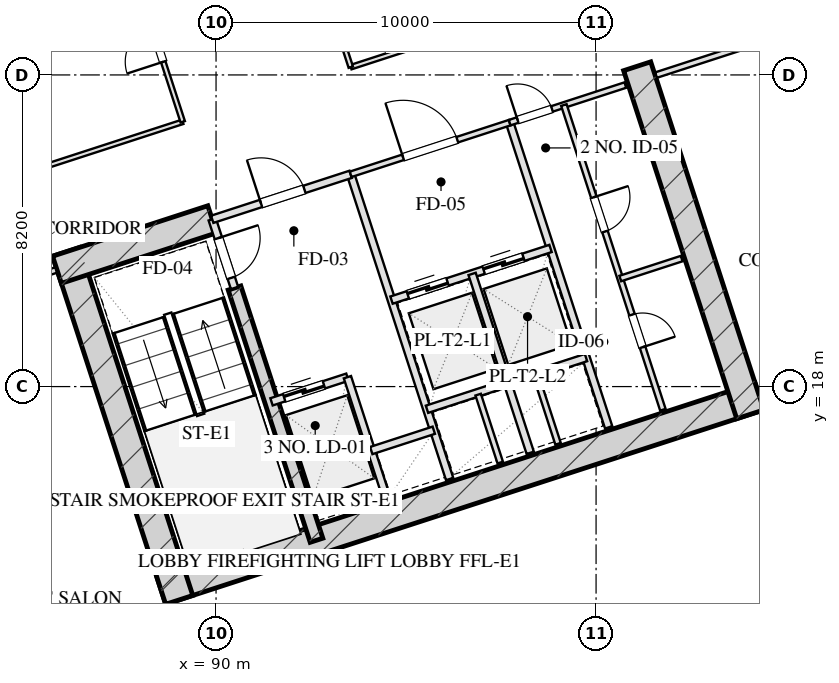
"""IFC4 building model, lengths in metres.
Left out: names, types, materials, properties, quantities, classifications, styles, units other than length and angle.
Written with IfcOpenShell. Run it as: python <this file> out.ifc"""

import sys

from ifc_helpers import new_model, si_unit, direction, frame, frame_2d, origin, place, context, subcontext, project, spatial, rectangle, extrude, element, fill, save


model = new_model("IFC4")
c1 = context("Model", 3, precision=1e-05, world=origin(), true_north=direction((0.0, 1.0)))
c2 = subcontext(c1, "Body", "Model", "MODEL_VIEW")
j1 = project(units=[si_unit("LENGTHUNIT", "METRE"), si_unit("PLANEANGLEUNIT", "RADIAN")], contexts=[c1])
p1 = place(None, origin())
s1 = spatial("IfcSite", under=j1, at=p1, CompositionType="ELEMENT")
p2 = place(p1, origin())
s2 = spatial("IfcBuilding", under=s1, at=p2, CompositionType="ELEMENT")
p3 = place(p2, frame((0.0, 0.0, 60.95)))
s3 = spatial("IfcBuildingStorey", under=s2, at=p3, CompositionType="ELEMENT", Elevation=60.95)
p4 = place(p3, frame((88.559, 12.629, 0.0), z_axis=(0.0, 0.0, 1.0), x_axis=(0.951056072937, 0.309018358888, 0.0)))
e1 = element("IfcWall", 1, at=p4, inside=s3, PredefinedType="SHEAR", context=c2, shape_type="SweptSolid", body=[
    extrude(rectangle(XDim=16.55, YDim=0.75, at=frame_2d((8.275, 0.0))), origin(), (0.0, 0.0, 1.0), 3.45),
])
p5 = place(p3, frame((86.055, 21.546, 0.0), z_axis=(0.0, 0.0, 1.0), x_axis=(0.309023585745, -0.951054374604, 0.0)))
e2 = element("IfcWall", 2, at=p5, inside=s3, PredefinedType="SHEAR", context=c2, shape_type="SweptSolid", body=[
    extrude(rectangle(XDim=9.63, YDim=0.75, at=frame_2d((4.815, 0.0))), origin(), (0.0, 0.0, 1.0), 3.45),
])
p6 = place(p3, frame((101.082, 26.429, 0.0), z_axis=(0.0, 0.0, 1.0), x_axis=(0.309016134813, -0.951056795583, 0.0)))
e3 = element("IfcWall", 3, at=p6, inside=s3, PredefinedType="SHEAR", context=c2, shape_type="SweptSolid", body=[
    extrude(rectangle(XDim=9.63, YDim=0.75, at=frame_2d((4.815, 0.0))), origin(), (0.0, 0.0, 1.0), 3.45),
])
p7 = place(p3, frame((90.486, 20.594, 0.0), z_axis=(0.0, 0.0, 1.0), x_axis=(0.309020428229, -0.951055400562, 0.0)))
e4 = element("IfcWall", 4, at=p7, inside=s3, PredefinedType="SHEAR", context=c2, shape_type="SweptSolid", body=[
    extrude(rectangle(XDim=6.98, YDim=0.35, at=frame_2d((3.49, 0.0))), origin(), (0.0, 0.0, 1.0), 3.45),
])
p8 = place(p3, frame((85.814, 21.074, 0.0), z_axis=(0.0, 0.0, 1.0), x_axis=(0.95106580992, 0.308988390074, 0.0)))
e5 = element("IfcWall", 5, at=p8, inside=s3, PredefinedType="SHEAR", context=c2, shape_type="SweptSolid", body=[
    extrude(rectangle(XDim=4.295, YDim=0.75, at=frame_2d((2.147, 0.0))), origin(), (0.0, 0.0, 1.0), 3.45),
])
p9 = place(p3, frame((100.345, 63.648, 0.0), z_axis=(0.0, 0.0, 1.0), x_axis=(0.309014526607, -0.951057318118, 0.0)))
e6 = element("IfcWall", 6, at=p9, inside=s3, PredefinedType="SOLIDWALL", context=c2, shape_type="SweptSolid", body=[
    extrude(rectangle(XDim=50.0, YDim=0.4, at=frame_2d((25.0, 0.0))), origin(), (0.0, 0.0, 1.0), 2.61),
])
p10 = place(p9, frame((27.55, 0.0, 0.0)))
e7 = element("IfcOpeningElement", 7, at=p10, cuts=e6, PredefinedType="OPENING", context=c2, shape_type="SweptSolid", body=[
    extrude(rectangle(XDim=1.1, YDim=2.15, at=frame_2d((0.55, 1.075))), frame((0.0, 0.21, 0.0), z_axis=(0.0, -1.0, 0.0), x_axis=(1.0, 0.0, 0.0)), (0.0, 0.0, 1.0), 0.42),
])
p11 = place(p3, frame((113.998, 12.567, 0.0), z_axis=(0.0, 0.0, 1.0), x_axis=(-0.951055939317, -0.309018770125, 0.0)))
e8 = element("IfcWall", 8, at=p11, inside=s3, PredefinedType="SOLIDWALL", context=c2, shape_type="SweptSolid", body=[
    extrude(rectangle(XDim=32.4, YDim=0.4, at=frame_2d((16.2, 0.0))), origin(), (0.0, 0.0, 1.0), 2.61),
])
p12 = place(p3, frame((89.899, 22.401, 0.0), z_axis=(0.0, 0.0, 1.0), x_axis=(0.308932062672, -0.951084108086, 0.0)))
e9 = element("IfcWall", 9, at=p12, inside=s3, PredefinedType="PARTITIONING", context=c2, shape_type="SweptSolid", body=[
    extrude(rectangle(XDim=1.9, YDim=0.2, at=frame_2d((0.95, 0.0))), origin(), (0.0, 0.0, 1.0), 3.175),
])
p13 = place(p12, frame((0.52, 0.0, 0.0)))
e10 = element("IfcOpeningElement", 10, at=p13, cuts=e9, PredefinedType="OPENING", context=c2, shape_type="SweptSolid", body=[
    extrude(rectangle(XDim=1.1, YDim=2.05, at=frame_2d((0.55, 1.025))), frame((0.0, 0.11, 0.0), z_axis=(0.0, -1.0, 0.0), x_axis=(1.0, 0.0, 0.0)), (0.0, 0.0, 1.0), 0.22),
])
p14 = place(p3, frame((93.542, 23.585, 0.0), z_axis=(0.0, 0.0, 1.0), x_axis=(0.309042196757, -0.951048327176, 0.0)))
e11 = element("IfcWall", 11, at=p14, inside=s3, PredefinedType="PARTITIONING", context=c2, shape_type="SweptSolid", body=[
    extrude(rectangle(XDim=8.43, YDim=0.2, at=frame_2d((4.215, 0.0))), origin(), (0.0, 0.0, 1.0), 3.175),
])
p15 = place(p3, frame((89.899, 22.401, 0.0), z_axis=(0.0, 0.0, 1.0), x_axis=(0.951046716504, 0.309047153403, 0.0)))
e12 = element("IfcWall", 12, at=p15, inside=s3, PredefinedType="PARTITIONING", context=c2, shape_type="SweptSolid", body=[
    extrude(rectangle(XDim=3.83, YDim=0.2, at=frame_2d((1.915, 0.0))), origin(), (0.0, 0.0, 1.0), 3.175),
])
p16 = place(p15, frame((1.35, 0.0, 0.0)))
e13 = element("IfcOpeningElement", 13, at=p16, cuts=e12, PredefinedType="OPENING", context=c2, shape_type="SweptSolid", body=[
    extrude(rectangle(XDim=1.2, YDim=2.05, at=frame_2d((0.6, 1.025))), frame((0.0, 0.11, 0.0), z_axis=(0.0, -1.0, 0.0), x_axis=(1.0, 0.0, 0.0)), (0.0, 0.0, 1.0), 0.22),
])
p17 = place(p3, frame((91.46, 17.598, 0.0), z_axis=(0.0, 0.0, 1.0), x_axis=(0.951062257173, 0.308999325213, 0.0)))
e14 = element("IfcWall", 14, at=p17, inside=s3, PredefinedType="PARTITIONING", context=c2, shape_type="SweptSolid", body=[
    extrude(rectangle(XDim=2.1, YDim=0.2, at=frame_2d((1.05, 0.0))), origin(), (0.0, 0.0, 1.0), 3.175),
])
p18 = place(p17, frame((0.35, 0.0, 0.0)))
e15 = element("IfcOpeningElement", 15, at=p18, cuts=e14, PredefinedType="OPENING", context=c2, shape_type="SweptSolid", body=[
    extrude(rectangle(XDim=1.1, YDim=2.05, at=frame_2d((0.55, 1.025))), frame((0.0, 0.11, 0.0), z_axis=(0.0, -1.0, 0.0), x_axis=(1.0, 0.0, 0.0)), (0.0, 0.0, 1.0), 0.22),
])
p19 = place(p3, frame((93.457, 18.247, 0.0), z_axis=(0.0, 0.0, 1.0), x_axis=(0.3089935693, -0.951064127245, 0.0)))
e16 = element("IfcWall", 16, at=p19, inside=s3, PredefinedType="PARTITIONING", context=c2, shape_type="SweptSolid", body=[
    extrude(rectangle(XDim=3.7, YDim=0.2, at=frame_2d((1.85, 0.0))), origin(), (0.0, 0.0, 1.0), 3.175),
])
p20 = place(p3, frame((94.084, 16.317, 0.0), z_axis=(0.0, 0.0, 1.0), x_axis=(0.951041328149, 0.309063734775, 0.0)))
e17 = element("IfcWall", 17, at=p20, inside=s3, PredefinedType="PARTITIONING", context=c2, shape_type="SweptSolid", body=[
    extrude(rectangle(XDim=1.73, YDim=0.2, at=frame_2d((0.865, 0.0))), origin(), (0.0, 0.0, 1.0), 3.175),
])
p21 = place(p3, frame((97.727, 24.944, 0.0), z_axis=(0.0, 0.0, 1.0), x_axis=(0.309016001439, -0.951056838919, 0.0)))
e18 = element("IfcWall", 18, at=p21, inside=s3, PredefinedType="PARTITIONING", context=c2, shape_type="SweptSolid", body=[
    extrude(rectangle(XDim=8.43, YDim=0.2, at=frame_2d((4.215, 0.0))), origin(), (0.0, 0.0, 1.0), 3.175),
])
p22 = place(p3, frame((93.542, 23.585, 0.0), z_axis=(0.0, 0.0, 1.0), x_axis=(0.951063829732, 0.308994485023, 0.0)))
e19 = element("IfcWall", 19, at=p22, inside=s3, PredefinedType="PARTITIONING", context=c2, shape_type="SweptSolid", body=[
    extrude(rectangle(XDim=4.4, YDim=0.15, at=frame_2d((2.2, 0.0))), origin(), (0.0, 0.0, 1.0), 3.175),
])
p23 = place(p22, frame((1.45, 0.0, 0.0)))
e20 = element("IfcOpeningElement", 20, at=p23, cuts=e19, PredefinedType="OPENING", context=c2, shape_type="SweptSolid", body=[
    extrude(rectangle(XDim=1.5, YDim=2.05, at=frame_2d((0.75, 1.025))), frame((0.0, 0.085, 0.0), z_axis=(0.0, -1.0, 0.0), x_axis=(1.0, 0.0, 0.0)), (0.0, 0.0, 1.0), 0.17),
])
p24 = place(p3, frame((94.617, 20.275, 0.0), z_axis=(0.0, 0.0, 1.0), x_axis=(0.951058531764, 0.30901079133, 0.0)))
e21 = element("IfcWall", 21, at=p24, inside=s3, PredefinedType="PARTITIONING", context=c2, shape_type="SweptSolid", body=[
    extrude(rectangle(XDim=4.4, YDim=0.2, at=frame_2d((2.2, 0.0))), origin(), (0.0, 0.0, 1.0), 3.175),
])
p25 = place(p24, frame((0.45, 0.0, 0.0)))
e22 = element("IfcOpeningElement", 22, at=p25, cuts=e21, PredefinedType="OPENING", context=c2, shape_type="SweptSolid", body=[
    extrude(rectangle(XDim=1.1, YDim=2.05, at=frame_2d((0.55, 1.025))), frame((0.0, 0.11, 0.0), z_axis=(0.0, -1.0, 0.0), x_axis=(1.0, 0.0, 0.0)), (0.0, 0.0, 1.0), 0.22),
])
p26 = place(p24, frame((2.55, 0.0, 0.0)))
e23 = element("IfcOpeningElement", 23, at=p26, cuts=e21, PredefinedType="OPENING", context=c2, shape_type="SweptSolid", body=[
    extrude(rectangle(XDim=1.1, YDim=2.05, at=frame_2d((0.55, 1.025))), frame((0.0, 0.11, 0.0), z_axis=(0.0, -1.0, 0.0), x_axis=(1.0, 0.0, 0.0)), (0.0, 0.0, 1.0), 0.22),
])
p27 = place(p3, frame((96.738, 20.964, 0.0), z_axis=(0.0, 0.0, 1.0), x_axis=(0.309042578481, -0.951048203135, 0.0)))
e24 = element("IfcWall", 24, at=p27, inside=s3, PredefinedType="PARTITIONING", context=c2, shape_type="SweptSolid", body=[
    extrude(rectangle(XDim=4.95, YDim=0.2, at=frame_2d((2.475, 0.0))), origin(), (0.0, 0.0, 1.0), 3.175),
])
p28 = place(p3, frame((95.551, 17.403, 0.0), z_axis=(0.0, 0.0, 1.0), x_axis=(0.951058531764, 0.30901079133, 0.0)))
e25 = element("IfcWall", 25, at=p28, inside=s3, PredefinedType="PARTITIONING", context=c2, shape_type="SweptSolid", body=[
    extrude(rectangle(XDim=4.4, YDim=0.2, at=frame_2d((2.2, 0.0))), origin(), (0.0, 0.0, 1.0), 3.175),
])
p29 = place(p3, frame((96.897, 17.788, 0.0), z_axis=(0.0, 0.0, 1.0), x_axis=(0.30897153969, -0.951071284217, 0.0)))
e26 = element("IfcWall", 26, at=p29, inside=s3, PredefinedType="PARTITIONING", context=c2, shape_type="SweptSolid", body=[
    extrude(rectangle(XDim=1.88, YDim=0.15, at=frame_2d((0.94, 0.0))), origin(), (0.0, 0.0, 1.0), 3.175),
])
p30 = place(p3, frame((98.419, 18.282, 0.0), z_axis=(0.0, 0.0, 1.0), x_axis=(0.308933380006, -0.951083680187, 0.0)))
e27 = element("IfcWall", 27, at=p30, inside=s3, PredefinedType="PARTITIONING", context=c2, shape_type="SweptSolid", body=[
    extrude(rectangle(XDim=1.88, YDim=0.15, at=frame_2d((0.94, 0.0))), origin(), (0.0, 0.0, 1.0), 3.175),
])
p31 = place(p3, frame((97.727, 24.944, 0.0), z_axis=(0.0, 0.0, 1.0), x_axis=(0.951036872128, 0.309077446369, 0.0)))
e28 = element("IfcWall", 28, at=p31, inside=s3, PredefinedType="PARTITIONING", context=c2, shape_type="SweptSolid", body=[
    extrude(rectangle(XDim=3.2, YDim=0.15, at=frame_2d((1.6, 0.0))), origin(), (0.0, 0.0, 1.0), 3.175),
])
p32 = place(p31, frame((0.22, 0.0, 0.0)))
e29 = element("IfcOpeningElement", 29, at=p32, cuts=e28, PredefinedType="OPENING", context=c2, shape_type="SweptSolid", body=[
    extrude(rectangle(XDim=0.95, YDim=2.05, at=frame_2d((0.475, 1.025))), frame((0.0, 0.085, 0.0), z_axis=(0.0, -1.0, 0.0), x_axis=(1.0, 0.0, 0.0)), (0.0, 0.0, 1.0), 0.17),
])
p33 = place(p3, frame((99.153, 25.408, 0.0), z_axis=(0.0, 0.0, 1.0), x_axis=(0.309016001439, -0.951056838919, 0.0)))
e30 = element("IfcWall", 30, at=p33, inside=s3, PredefinedType="PARTITIONING", context=c2, shape_type="SweptSolid", body=[
    extrude(rectangle(XDim=8.43, YDim=0.15, at=frame_2d((4.215, 0.0))), origin(), (0.0, 0.0, 1.0), 3.175),
])
p34 = place(p33, frame((2.55, 0.0, 0.0)))
e31 = element("IfcOpeningElement", 31, at=p34, cuts=e30, PredefinedType="OPENING", context=c2, shape_type="SweptSolid", body=[
    extrude(rectangle(XDim=0.95, YDim=2.05, at=frame_2d((0.475, 1.025))), frame((0.0, 0.085, 0.0), z_axis=(0.0, -1.0, 0.0), x_axis=(1.0, 0.0, 0.0)), (0.0, 0.0, 1.0), 0.17),
])
p35 = place(p33, frame((5.8, 0.0, 0.0)))
e32 = element("IfcOpeningElement", 32, at=p35, cuts=e30, PredefinedType="OPENING", context=c2, shape_type="SweptSolid", body=[
    extrude(rectangle(XDim=0.9, YDim=2.05, at=frame_2d((0.45, 1.025))), frame((0.0, 0.085, 0.0), z_axis=(0.0, -1.0, 0.0), x_axis=(1.0, 0.0, 0.0)), (0.0, 0.0, 1.0), 0.17),
])
p36 = place(p3, frame((100.636, 20.843, 0.0), z_axis=(0.0, 0.0, 1.0), x_axis=(0.951040401051, 0.309066587596, 0.0)))
e33 = element("IfcWall", 33, at=p36, inside=s3, PredefinedType="PARTITIONING", context=c2, shape_type="SweptSolid", body=[
    extrude(rectangle(XDim=1.7, YDim=0.15, at=frame_2d((0.85, 0.0))), origin(), (0.0, 0.0, 1.0), 3.175),
])
p37 = place(p3, frame((75.519, 17.729, 0.0), z_axis=(0.0, 0.0, 1.0), x_axis=(0.951056658866, 0.309016555588, 0.0)))
e34 = element("IfcWall", 34, at=p37, inside=s3, PredefinedType="PARTITIONING", context=c2, shape_type="SweptSolid", body=[
    extrude(rectangle(XDim=10.8, YDim=0.15, at=frame_2d((5.4, 0.0))), origin(), (0.0, 0.0, 1.0), 3.175),
])
p38 = place(p37, frame((4.536, 0.0, 0.0)))
e35 = element("IfcOpeningElement", 35, at=p38, cuts=e34, PredefinedType="OPENING", context=c2, shape_type="SweptSolid", body=[
    extrude(rectangle(XDim=1.0, YDim=2.05, at=frame_2d((0.5, 1.025))), frame((0.0, 0.085, 0.0), z_axis=(0.0, -1.0, 0.0), x_axis=(1.0, 0.0, 0.0)), (0.0, 0.0, 1.0), 0.17),
])
p39 = place(p3, frame((101.578, 26.196, 0.0), z_axis=(0.0, 0.0, 1.0), x_axis=(0.951059043131, 0.309009217467, 0.0)))
e36 = element("IfcWall", 36, at=p39, inside=s3, PredefinedType="PARTITIONING", context=c2, shape_type="SweptSolid", body=[
    extrude(rectangle(XDim=10.2, YDim=0.15, at=frame_2d((5.1, 0.0))), origin(), (0.0, 0.0, 1.0), 3.175),
])
p40 = place(p39, frame((4.284, 0.0, 0.0)))
e37 = element("IfcOpeningElement", 37, at=p40, cuts=e36, PredefinedType="OPENING", context=c2, shape_type="SweptSolid", body=[
    extrude(rectangle(XDim=1.0, YDim=2.05, at=frame_2d((0.5, 1.025))), frame((0.0, 0.085, 0.0), z_axis=(0.0, -1.0, 0.0), x_axis=(1.0, 0.0, 0.0)), (0.0, 0.0, 1.0), 0.17),
])
p41 = place(p3, frame((74.691, 20.278, 0.0), z_axis=(0.0, 0.0, 1.0), x_axis=(0.951054756643, 0.309022409974, 0.0)))
e38 = element("IfcWall", 38, at=p41, inside=s3, PredefinedType="PARTITIONING", context=c2, shape_type="SweptSolid", body=[
    extrude(rectangle(XDim=15.175, YDim=0.12, at=frame_2d((7.587, 0.0))), origin(), (0.0, 0.0, 1.0), 3.175),
])
p42 = place(p3, frame((93.546, 26.404, 0.0), z_axis=(0.0, 0.0, 1.0), x_axis=(0.951058189574, 0.309011844505, 0.0)))
e39 = element("IfcWall", 39, at=p42, inside=s3, PredefinedType="PARTITIONING", context=c2, shape_type="SweptSolid", body=[
    extrude(rectangle(XDim=17.775, YDim=0.12, at=frame_2d((8.887, 0.0))), origin(), (0.0, 0.0, 1.0), 3.175),
])
p43 = place(p3, frame((89.124, 24.967, 0.0), z_axis=(0.0, 0.0, 1.0), x_axis=(-0.30901773025, 0.951056277195, 0.0)))
e40 = element("IfcWall", 40, at=p43, inside=s3, PredefinedType="PARTITIONING", context=c2, shape_type="SweptSolid", body=[
    extrude(rectangle(XDim=16.64, YDim=0.12, at=frame_2d((8.32, 0.0))), origin(), (0.0, 0.0, 1.0), 3.175),
])
p44 = place(p43, frame((1.66, 0.0, 0.0)))
e41 = element("IfcOpeningElement", 41, at=p44, cuts=e40, PredefinedType="OPENING", context=c2, shape_type="SweptSolid", body=[
    extrude(rectangle(XDim=1.0, YDim=2.05, at=frame_2d((0.5, 1.025))), frame((0.0, 0.07, 0.0), z_axis=(0.0, -1.0, 0.0), x_axis=(1.0, 0.0, 0.0)), (0.0, 0.0, 1.0), 0.14),
])
p45 = place(p43, frame((7.82, 0.0, 0.0)))
e42 = element("IfcOpeningElement", 42, at=p45, cuts=e40, PredefinedType="OPENING", context=c2, shape_type="SweptSolid", body=[
    extrude(rectangle(XDim=1.0, YDim=2.05, at=frame_2d((0.5, 1.025))), frame((0.0, 0.07, 0.0), z_axis=(0.0, -1.0, 0.0), x_axis=(1.0, 0.0, 0.0)), (0.0, 0.0, 1.0), 0.14),
])
p46 = place(p43, frame((13.98, 0.0, 0.0)))
e43 = element("IfcOpeningElement", 43, at=p46, cuts=e40, PredefinedType="OPENING", context=c2, shape_type="SweptSolid", body=[
    extrude(rectangle(XDim=1.0, YDim=2.05, at=frame_2d((0.5, 1.025))), frame((0.0, 0.07, 0.0), z_axis=(0.0, -1.0, 0.0), x_axis=(1.0, 0.0, 0.0)), (0.0, 0.0, 1.0), 0.14),
])
p47 = place(p3, frame((93.546, 26.404, 0.0), z_axis=(0.0, 0.0, 1.0), x_axis=(-0.309022042254, 0.951054876125, 0.0)))
e44 = element("IfcWall", 44, at=p47, inside=s3, PredefinedType="PARTITIONING", context=c2, shape_type="SweptSolid", body=[
    extrude(rectangle(XDim=16.64, YDim=0.12, at=frame_2d((8.32, 0.0))), origin(), (0.0, 0.0, 1.0), 3.175),
])
p48 = place(p47, frame((1.16, 0.0, 0.0)))
e45 = element("IfcOpeningElement", 45, at=p48, cuts=e44, PredefinedType="OPENING", context=c2, shape_type="SweptSolid", body=[
    extrude(rectangle(XDim=1.0, YDim=2.05, at=frame_2d((0.5, 1.025))), frame((0.0, 0.07, 0.0), z_axis=(0.0, -1.0, 0.0), x_axis=(1.0, 0.0, 0.0)), (0.0, 0.0, 1.0), 0.14),
])
p49 = place(p47, frame((4.72, 0.0, 0.0)))
e46 = element("IfcOpeningElement", 46, at=p49, cuts=e44, PredefinedType="OPENING", context=c2, shape_type="SweptSolid", body=[
    extrude(rectangle(XDim=0.85, YDim=2.05, at=frame_2d((0.425, 1.025))), frame((0.0, 0.07, 0.0), z_axis=(0.0, -1.0, 0.0), x_axis=(1.0, 0.0, 0.0)), (0.0, 0.0, 1.0), 0.14),
])
p50 = place(p47, frame((7.549, 0.0, 0.0)))
e47 = element("IfcOpeningElement", 47, at=p50, cuts=e44, PredefinedType="OPENING", context=c2, shape_type="SweptSolid", body=[
    extrude(rectangle(XDim=1.0, YDim=2.05, at=frame_2d((0.5, 1.025))), frame((0.0, 0.07, 0.0), z_axis=(0.0, -1.0, 0.0), x_axis=(1.0, 0.0, 0.0)), (0.0, 0.0, 1.0), 0.14),
])
p51 = place(p47, frame((10.148, 0.0, 0.0)))
e48 = element("IfcOpeningElement", 48, at=p51, cuts=e44, PredefinedType="OPENING", context=c2, shape_type="SweptSolid", body=[
    extrude(rectangle(XDim=1.05, YDim=2.05, at=frame_2d((0.525, 1.025))), frame((0.0, 0.07, 0.0), z_axis=(0.0, -1.0, 0.0), x_axis=(1.0, 0.0, 0.0)), (0.0, 0.0, 1.0), 0.14),
])
p52 = place(p47, frame((14.48, 0.0, 0.0)))
e49 = element("IfcOpeningElement", 49, at=p52, cuts=e44, PredefinedType="OPENING", context=c2, shape_type="SweptSolid", body=[
    extrude(rectangle(XDim=1.0, YDim=2.05, at=frame_2d((0.5, 1.025))), frame((0.0, 0.07, 0.0), z_axis=(0.0, -1.0, 0.0), x_axis=(1.0, 0.0, 0.0)), (0.0, 0.0, 1.0), 0.14),
])
p53 = place(p3, frame((73.356, 24.386, 0.0), z_axis=(0.0, 0.0, 1.0), x_axis=(0.951054756643, 0.309022409974, 0.0)))
e50 = element("IfcWall", 50, at=p53, inside=s3, PredefinedType="PARTITIONING", context=c2, shape_type="SweptSolid", body=[
    extrude(rectangle(XDim=15.175, YDim=0.12, at=frame_2d((7.587, 0.0))), origin(), (0.0, 0.0, 1.0), 3.175),
])
p54 = place(p13, origin())
e51 = element("IfcDoor", 51, at=p54, inside=s3, OperationType="SINGLE_SWING_LEFT", PredefinedType="DOOR", context=c2, shape_type="SweptSolid", body=[
    extrude(rectangle(XDim=1.1, YDim=2.05, at=frame_2d((0.55, 1.025))), frame((0.0, 0.025, 0.0), z_axis=(0.0, -1.0, 0.0), x_axis=(1.0, 0.0, 0.0)), (0.0, 0.0, 1.0), 0.05),
])
fill(e10, e51)
p55 = place(p16, origin())
e52 = element("IfcDoor", 52, at=p55, inside=s3, OperationType="SINGLE_SWING_LEFT", PredefinedType="DOOR", context=c2, shape_type="SweptSolid", body=[
    extrude(rectangle(XDim=1.2, YDim=2.05, at=frame_2d((0.6, 1.025))), frame((0.0, 0.025, 0.0), z_axis=(0.0, -1.0, 0.0), x_axis=(1.0, 0.0, 0.0)), (0.0, 0.0, 1.0), 0.05),
])
fill(e13, e52)
p56 = place(p18, origin())
e53 = element("IfcDoor", 53, at=p56, inside=s3, OperationType="DOUBLE_DOOR_SLIDING", PredefinedType="DOOR", context=c2, shape_type="SweptSolid", body=[
    extrude(rectangle(XDim=1.1, YDim=2.05, at=frame_2d((0.55, 1.025))), frame((0.0, 0.025, 0.0), z_axis=(0.0, -1.0, 0.0), x_axis=(1.0, 0.0, 0.0)), (0.0, 0.0, 1.0), 0.05),
])
fill(e15, e53)
p57 = place(p23, origin())
e54 = element("IfcDoor", 54, at=p57, inside=s3, OperationType="SINGLE_SWING_LEFT", PredefinedType="DOOR", context=c2, shape_type="SweptSolid", body=[
    extrude(rectangle(XDim=1.5, YDim=2.05, at=frame_2d((0.75, 1.025))), frame((0.0, 0.025, 0.0), z_axis=(0.0, -1.0, 0.0), x_axis=(1.0, 0.0, 0.0)), (0.0, 0.0, 1.0), 0.05),
])
fill(e20, e54)
p58 = place(p25, origin())
e55 = element("IfcDoor", 55, at=p58, inside=s3, OperationType="DOUBLE_DOOR_SLIDING", PredefinedType="DOOR", context=c2, shape_type="SweptSolid", body=[
    extrude(rectangle(XDim=1.1, YDim=2.05, at=frame_2d((0.55, 1.025))), frame((0.0, 0.025, 0.0), z_axis=(0.0, -1.0, 0.0), x_axis=(1.0, 0.0, 0.0)), (0.0, 0.0, 1.0), 0.05),
])
fill(e22, e55)
p59 = place(p26, origin())
e56 = element("IfcDoor", 56, at=p59, inside=s3, OperationType="DOUBLE_DOOR_SLIDING", PredefinedType="DOOR", context=c2, shape_type="SweptSolid", body=[
    extrude(rectangle(XDim=1.1, YDim=2.05, at=frame_2d((0.55, 1.025))), frame((0.0, 0.025, 0.0), z_axis=(0.0, -1.0, 0.0), x_axis=(1.0, 0.0, 0.0)), (0.0, 0.0, 1.0), 0.05),
])
fill(e23, e56)
p60 = place(p32, origin())
e57 = element("IfcDoor", 57, at=p60, inside=s3, OperationType="SINGLE_SWING_LEFT", PredefinedType="DOOR", context=c2, shape_type="SweptSolid", body=[
    extrude(rectangle(XDim=0.95, YDim=2.05, at=frame_2d((0.475, 1.025))), frame((0.0, 0.025, 0.0), z_axis=(0.0, -1.0, 0.0), x_axis=(1.0, 0.0, 0.0)), (0.0, 0.0, 1.0), 0.05),
])
fill(e29, e57)
p61 = place(p34, origin())
e58 = element("IfcDoor", 58, at=p61, inside=s3, OperationType="SINGLE_SWING_LEFT", PredefinedType="DOOR", context=c2, shape_type="SweptSolid", body=[
    extrude(rectangle(XDim=0.95, YDim=2.05, at=frame_2d((0.475, 1.025))), frame((0.0, 0.025, 0.0), z_axis=(0.0, -1.0, 0.0), x_axis=(1.0, 0.0, 0.0)), (0.0, 0.0, 1.0), 0.05),
])
fill(e31, e58)
p62 = place(p35, origin())
e59 = element("IfcDoor", 59, at=p62, inside=s3, OperationType="SINGLE_SWING_RIGHT", PredefinedType="DOOR", context=c2, shape_type="SweptSolid", body=[
    extrude(rectangle(XDim=0.9, YDim=2.05, at=frame_2d((0.45, 1.025))), frame((0.0, 0.025, 0.0), z_axis=(0.0, -1.0, 0.0), x_axis=(1.0, 0.0, 0.0)), (0.0, 0.0, 1.0), 0.05),
])
fill(e32, e59)
p63 = place(p44, origin())
e60 = element("IfcDoor", 60, at=p63, inside=s3, OperationType="SINGLE_SWING_LEFT", PredefinedType="DOOR", context=c2, shape_type="SweptSolid", body=[
    extrude(rectangle(XDim=1.0, YDim=2.05, at=frame_2d((0.5, 1.025))), frame((0.0, 0.025, 0.0), z_axis=(0.0, -1.0, 0.0), x_axis=(1.0, 0.0, 0.0)), (0.0, 0.0, 1.0), 0.05),
])
fill(e41, e60)
save(model, sys.argv[1])
